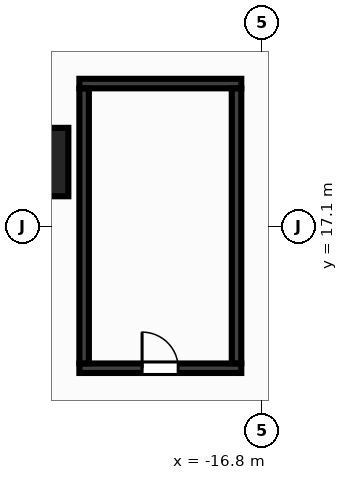
"""IFC4 building model, lengths in metres.
Left out: names, types, materials, properties, quantities, classifications, styles, units other than length and angle.
Written with IfcOpenShell. Run it as: python <this file> out.ifc"""

import sys

from ifc_helpers import new_model, si_unit, direction, frame, frame_2d, origin, origin_2d, place, context, subcontext, project, spatial, rectangle, extrude, source, transform, mapped, element, fill, save


model = new_model("IFC4")
c1 = context("Model", 3, precision=1e-05, world=origin(), true_north=direction((0.0, 1.0)))
c2 = subcontext(c1, "Body", "Model", "MODEL_VIEW")
j1 = project(units=[si_unit("LENGTHUNIT", "METRE"), si_unit("PLANEANGLEUNIT", "RADIAN")], contexts=[c1])
p1 = place(None, origin())
s1 = spatial("IfcSite", under=j1, at=p1, CompositionType="ELEMENT")
p2 = place(p1, origin())
s2 = spatial("IfcBuilding", under=s1, at=p2, CompositionType="ELEMENT")
p3 = place(p2, frame((0.0, 0.0, -11.0)))
s3 = spatial("IfcBuildingStorey", under=s2, at=p3, CompositionType="ELEMENT", Elevation=-11.0)
m1 = source(origin(), c2, "Body", "SweptSolid", [
    extrude(rectangle(XDim=4.26, YDim=0.25, at=frame_2d((2.13, 0.0))), origin(), (0.0, 0.0, 1.0), 5.5),
])
p4 = place(p3, frame((-21.61, 20.865, 0.0), z_axis=(0.0, 0.0, 1.0), x_axis=(1.0, 0.0, 0.0)))
e1 = element("IfcWall", 1, at=p4, inside=s3, PredefinedType="SHEAR", context=c2, shape_type="MappedRepresentation", body=[
    mapped(m1, transform((0.0, 0.0, 0.0), x_axis=(1.0, 0.0, 0.0), y_axis=(0.0, 1.0, 0.0), z_axis=(0.0, 0.0, 1.0), scale=1.0)),
])
p5 = place(p3, frame((-21.61, 13.375, 0.0), z_axis=(0.0, 0.0, 1.0), x_axis=(1.0, 0.0, 0.0)))
e2 = element("IfcWall", 2, at=p5, inside=s3, PredefinedType="SHEAR", context=c2, shape_type="MappedRepresentation", body=[
    mapped(m1, transform((0.0, 0.0, 0.0), x_axis=(1.0, 0.0, 0.0), y_axis=(0.0, 1.0, 0.0), z_axis=(0.0, 0.0, 1.0), scale=1.0)),
])
p6 = place(p5, frame((1.65, 0.0, 0.0)))
e3 = element("IfcOpeningElement", 3, at=p6, cuts=e2, PredefinedType="OPENING", context=c2, shape_type="SweptSolid", body=[
    extrude(rectangle(XDim=0.95, YDim=2.15, at=frame_2d((0.475, 1.075))), frame((0.0, 0.137, 0.0), z_axis=(0.0, -1.0, 0.0), x_axis=(1.0, 0.0, 0.0)), (0.0, 0.0, 1.0), 0.274),
])
m2 = source(origin(), c2, "Body", "SweptSolid", [
    extrude(rectangle(XDim=7.23, YDim=0.25, at=frame_2d((3.615, 0.0))), origin(), (0.0, 0.0, 1.0), 5.5),
])
for number, where, z_axis, x_axis in (
    (4, (-21.485, 13.505, 0.0), (0.0, 0.0, 1.0), (0.0, 1.0, 0.0)),
    (5, (-17.475, 13.505, 0.0), (0.0, 0.0, 1.0), (0.0, 1.0, 0.0)),
):
    element("IfcWall", number, at=place(p3, frame(where, z_axis=z_axis, x_axis=x_axis)), inside=s3, PredefinedType="SHEAR", context=c2, shape_type="MappedRepresentation", body=[
        mapped(m2, transform((0.0, 0.0, 0.0), x_axis=(1.0, 0.0, 0.0), y_axis=(0.0, 1.0, 0.0), z_axis=(0.0, 0.0, 1.0), scale=1.0)),
    ])
m3 = source(origin(), c2, "Body", "SweptSolid", [
    extrude(rectangle(XDim=1.8, YDim=1.8, at=origin_2d()), origin(), (0.0, 0.0, 1.0), 5.5),
])
p7 = place(p3, frame((-22.8, 18.8, 0.0), z_axis=(0.0, 0.0, 1.0), x_axis=(1.0, 0.0, 0.0)))
e6 = element("IfcColumn", 6, at=p7, inside=s3, PredefinedType="COLUMN", context=c2, shape_type="MappedRepresentation", body=[
    mapped(m3, transform((0.0, 0.0, 0.0), x_axis=(1.0, 0.0, 0.0), y_axis=(0.0, 1.0, 0.0), z_axis=(0.0, 0.0, 1.0), scale=1.0)),
])
m4 = source(origin(), c2, "Body", "SweptSolid", [
    extrude(rectangle(XDim=0.95, YDim=2.15, at=frame_2d((0.475, 1.075))), frame((0.0, 0.025, 0.0), z_axis=(0.0, -1.0, 0.0), x_axis=(1.0, 0.0, 0.0)), (0.0, 0.0, 1.0), 0.05),
])
p8 = place(p6, origin())
e7 = element("IfcDoor", 7, at=p8, inside=s3, OperationType="SINGLE_SWING_LEFT", PredefinedType="DOOR", context=c2, shape_type="MappedRepresentation", body=[
    mapped(m4, transform((0.0, 0.0, 0.0), x_axis=(1.0, 0.0, 0.0), y_axis=(0.0, 1.0, 0.0), z_axis=(0.0, 0.0, 1.0), scale=1.0)),
])
fill(e3, e7)
save(model, sys.argv[1])
